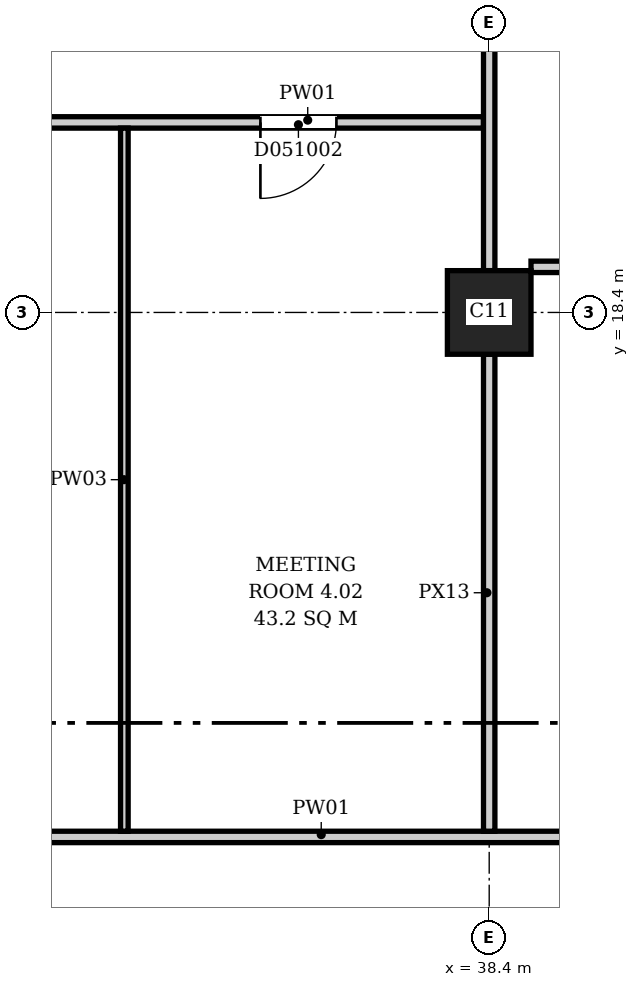
"""IFC4 building model, lengths in metres.
Left out: names, types, materials, properties, quantities, classifications, styles, units other than length and angle.
Written with IfcOpenShell. Run it as: python <this file> out.ifc"""

import sys

from ifc_helpers import new_model, si_unit, direction, frame, frame_2d, origin, origin_2d, place, context, subcontext, project, spatial, rectangle, extrude, element, fill, save


model = new_model("IFC4")
c1 = context("Model", 3, precision=1e-05, world=origin(), true_north=direction((0.0, 1.0)))
c2 = subcontext(c1, "Body", "Model", "MODEL_VIEW")
j1 = project(units=[si_unit("LENGTHUNIT", "METRE"), si_unit("PLANEANGLEUNIT", "RADIAN")], contexts=[c1])
p1 = place(None, origin())
s1 = spatial("IfcSite", under=j1, at=p1, CompositionType="ELEMENT")
p2 = place(p1, origin())
s2 = spatial("IfcBuilding", under=s1, at=p2, CompositionType="ELEMENT")
p3 = place(p2, frame((0.0, 0.0, 26.7)))
s3 = spatial("IfcBuildingStorey", under=s2, at=p3, CompositionType="ELEMENT", Elevation=26.7)
p4 = place(p3, frame((38.4, 18.4, 0.0), z_axis=(0.0, 0.0, 1.0), x_axis=(1.0, 0.0, 0.0)))
e1 = element("IfcColumn", 1, at=p4, inside=s3, PredefinedType="COLUMN", context=c2, shape_type="SweptSolid", body=[
    extrude(rectangle(XDim=1.1, YDim=1.1, at=origin_2d()), origin(), (0.0, 0.0, 1.0), 5.2),
])
p5 = place(p3, frame((27.206, 11.5, 0.0), z_axis=(0.0, 0.0, 1.0), x_axis=(1.0, 0.0, 0.0)))
e2 = element("IfcWall", 2, at=p5, inside=s3, PredefinedType="PARTITIONING", context=c2, shape_type="SweptSolid", body=[
    extrude(rectangle(XDim=25.669, YDim=0.15, at=frame_2d((12.834, 0.0))), origin(), (0.0, 0.0, 1.0), 4.85),
])
p6 = place(p5, frame((13.094, 0.0, 0.0)))
e3 = element("IfcOpeningElement", 3, at=p6, cuts=e2, PredefinedType="OPENING", context=c2, shape_type="SweptSolid", body=[
    extrude(rectangle(XDim=1.0, YDim=2.1, at=frame_2d((0.5, 1.05))), frame((0.0, 0.085, 0.0), z_axis=(0.0, -1.0, 0.0), x_axis=(1.0, 0.0, 0.0)), (0.0, 0.0, 1.0), 0.17),
])
p7 = place(p5, frame((17.894, 0.0, 0.0)))
e4 = element("IfcOpeningElement", 4, at=p7, cuts=e2, PredefinedType="OPENING", context=c2, shape_type="SweptSolid", body=[
    extrude(rectangle(XDim=1.0, YDim=2.1, at=frame_2d((0.5, 1.05))), frame((0.0, 0.085, 0.0), z_axis=(0.0, -1.0, 0.0), x_axis=(1.0, 0.0, 0.0)), (0.0, 0.0, 1.0), 0.17),
])
p8 = place(p5, frame((22.659, 0.0, 0.0)))
e5 = element("IfcOpeningElement", 5, at=p8, cuts=e2, PredefinedType="OPENING", context=c2, shape_type="SweptSolid", body=[
    extrude(rectangle(XDim=1.0, YDim=2.1, at=frame_2d((0.5, 1.05))), frame((0.0, 0.085, 0.0), z_axis=(0.0, -1.0, 0.0), x_axis=(1.0, 0.0, 0.0)), (0.0, 0.0, 1.0), 0.17),
])
p9 = place(p3, frame((29.075, 20.9, 0.0), z_axis=(0.0, 0.0, 1.0), x_axis=(1.0, 0.0, 0.0)))
e6 = element("IfcWall", 6, at=p9, inside=s3, PredefinedType="PARTITIONING", context=c2, shape_type="SweptSolid", body=[
    extrude(rectangle(XDim=9.25, YDim=0.15, at=frame_2d((4.625, 0.0))), origin(), (0.0, 0.0, 1.0), 4.85),
])
p10 = place(p9, frame((1.835, 0.0, 0.0)))
e7 = element("IfcOpeningElement", 7, at=p10, cuts=e6, PredefinedType="OPENING", context=c2, shape_type="SweptSolid", body=[
    extrude(rectangle(XDim=1.0, YDim=2.1, at=frame_2d((0.5, 1.05))), frame((0.0, 0.085, 0.0), z_axis=(0.0, -1.0, 0.0), x_axis=(1.0, 0.0, 0.0)), (0.0, 0.0, 1.0), 0.17),
])
p11 = place(p9, frame((6.315, 0.0, 0.0)))
e8 = element("IfcOpeningElement", 8, at=p11, cuts=e6, PredefinedType="OPENING", context=c2, shape_type="SweptSolid", body=[
    extrude(rectangle(XDim=1.0, YDim=2.1, at=frame_2d((0.5, 1.05))), frame((0.0, 0.085, 0.0), z_axis=(0.0, -1.0, 0.0), x_axis=(1.0, 0.0, 0.0)), (0.0, 0.0, 1.0), 0.17),
])
p12 = place(p3, frame((33.6, 11.575, 0.0), z_axis=(0.0, 0.0, 1.0), x_axis=(0.0, 1.0, 0.0)))
e9 = element("IfcWall", 9, at=p12, inside=s3, PredefinedType="PARTITIONING", context=c2, shape_type="SweptSolid", body=[
    extrude(rectangle(XDim=9.25, YDim=0.1, at=frame_2d((4.625, 0.0))), origin(), (0.0, 0.0, 1.0), 4.85),
])
p13 = place(p3, frame((38.4, 11.575, 0.0), z_axis=(0.0, 0.0, 1.0), x_axis=(0.0, 1.0, 0.0)))
e10 = element("IfcWall", 10, at=p13, inside=s3, PredefinedType="PARTITIONING", context=c2, shape_type="SweptSolid", body=[
    extrude(rectangle(XDim=6.275, YDim=0.15, at=frame_2d((3.138, 0.0))), origin(), (0.0, 0.0, 1.0), 4.45),
])
p14 = place(p3, frame((38.4, 18.95, 0.0), z_axis=(0.0, 0.0, 1.0), x_axis=(0.0, 1.0, 0.0)))
e11 = element("IfcWall", 11, at=p14, inside=s3, PredefinedType="PARTITIONING", context=c2, shape_type="SweptSolid", body=[
    extrude(rectangle(XDim=8.1, YDim=0.15, at=frame_2d((4.05, 0.0))), origin(), (0.0, 0.0, 1.0), 4.45),
])
p15 = place(p14, frame((3.55, 0.0, 0.0)))
e12 = element("IfcOpeningElement", 12, at=p15, cuts=e11, PredefinedType="OPENING", context=c2, shape_type="SweptSolid", body=[
    extrude(rectangle(XDim=1.0, YDim=2.1, at=frame_2d((0.5, 1.05))), frame((0.0, 0.085, 0.0), z_axis=(0.0, -1.0, 0.0), x_axis=(1.0, 0.0, 0.0)), (0.0, 0.0, 1.0), 0.17),
])
p16 = place(p3, frame((38.95, 19.0, 0.0), z_axis=(0.0, 0.0, 1.0), x_axis=(1.0, 0.0, 0.0)))
e13 = element("IfcWall", 13, at=p16, inside=s3, PredefinedType="PARTITIONING", context=c2, shape_type="SweptSolid", body=[
    extrude(rectangle(XDim=8.5, YDim=0.15, at=frame_2d((4.25, 0.0))), origin(), (0.0, 0.0, 1.0), 4.85),
])
p17 = place(p11, origin())
e14 = element("IfcDoor", 14, at=p17, inside=s3, OperationType="SINGLE_SWING_LEFT", PredefinedType="DOOR", context=c2, shape_type="SweptSolid", body=[
    extrude(rectangle(XDim=1.0, YDim=2.1, at=frame_2d((0.5, 1.05))), frame((0.0, 0.025, 0.0), z_axis=(0.0, -1.0, 0.0), x_axis=(1.0, 0.0, 0.0)), (0.0, 0.0, 1.0), 0.05),
])
fill(e8, e14)
save(model, sys.argv[1])
